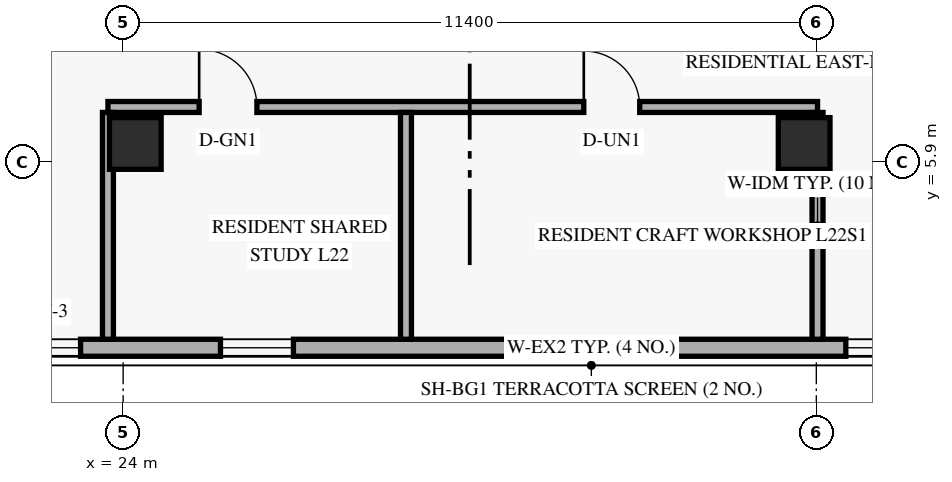
"""IFC4 building model, lengths in metres.
Left out: names, types, materials, properties, quantities, classifications, styles, units other than length and angle.
Written with IfcOpenShell. Run it as: python <this file> out.ifc"""

import sys

from ifc_helpers import new_model, si_unit, direction, frame, frame_2d, origin, origin_2d, place, context, subcontext, project, spatial, rectangle, extrude, element, fill, save


model = new_model("IFC4")
c1 = context("Model", 3, precision=1e-05, world=origin(), true_north=direction((0.0, 1.0)))
c2 = subcontext(c1, "Body", "Model", "MODEL_VIEW")
j1 = project(units=[si_unit("LENGTHUNIT", "METRE"), si_unit("PLANEANGLEUNIT", "RADIAN")], contexts=[c1])
p1 = place(None, origin())
s1 = spatial("IfcSite", under=j1, at=p1, CompositionType="ELEMENT")
p2 = place(p1, origin())
s2 = spatial("IfcBuilding", under=s1, at=p2, CompositionType="ELEMENT")
p3 = place(p2, frame((0.0, 0.0, 87.6)))
s3 = spatial("IfcBuildingStorey", under=s2, at=p3, CompositionType="ELEMENT", Elevation=87.6)
for number, where, z_axis, x_axis in (
    (1, (24.2, 6.2, 0.0), (0.0, 0.0, 1.0), (1.0, 0.0, 0.0)),
    (2, (35.2, 6.2, 0.0), (0.0, 0.0, 1.0), (1.0, 0.0, 0.0)),
):
    element("IfcColumn", number, at=place(p3, frame(where, z_axis=z_axis, x_axis=x_axis)), inside=s3, PredefinedType="COLUMN", context=c2, shape_type="SweptSolid", body=[
        extrude(rectangle(XDim=0.85, YDim=0.85, at=origin_2d()), origin(), (0.0, 0.0, 1.0), 3.6),
    ])
p4 = place(p3, frame((13.42, 2.84, 0.0), z_axis=(0.0, 0.0, 1.0), x_axis=(1.0, 0.0, 0.0)))
e3 = element("IfcWall", 3, at=p4, inside=s3, PredefinedType="SOLIDWALL", context=c2, shape_type="SweptSolid", body=[
    extrude(rectangle(XDim=36.56, YDim=0.28, at=frame_2d((18.28, 0.0))), origin(), (0.0, 0.0, 1.0), 3.36),
])
p5 = place(p4, frame((3.515, 0.0, 0.85)))
e4 = element("IfcOpeningElement", 4, at=p5, cuts=e3, PredefinedType="OPENING", context=c2, shape_type="SweptSolid", body=[
    extrude(rectangle(XDim=1.2, YDim=1.5, at=frame_2d((0.6, 0.75))), frame((0.0, 0.15, 0.0), z_axis=(0.0, -1.0, 0.0), x_axis=(1.0, 0.0, 0.0)), (0.0, 0.0, 1.0), 0.3),
])
p6 = place(p4, frame((8.68, 0.0, 0.85)))
e5 = element("IfcOpeningElement", 5, at=p6, cuts=e3, PredefinedType="OPENING", context=c2, shape_type="SweptSolid", body=[
    extrude(rectangle(XDim=1.2, YDim=1.5, at=frame_2d((0.6, 0.75))), frame((0.0, 0.15, 0.0), z_axis=(0.0, -1.0, 0.0), x_axis=(1.0, 0.0, 0.0)), (0.0, 0.0, 1.0), 0.3),
])
p7 = place(p4, frame((12.181, 0.0, 0.85)))
e6 = element("IfcOpeningElement", 6, at=p7, cuts=e3, PredefinedType="OPENING", context=c2, shape_type="SweptSolid", body=[
    extrude(rectangle(XDim=1.2, YDim=1.5, at=frame_2d((0.6, 0.75))), frame((0.0, 0.15, 0.0), z_axis=(0.0, -1.0, 0.0), x_axis=(1.0, 0.0, 0.0)), (0.0, 0.0, 1.0), 0.3),
])
p8 = place(p4, frame((18.016, 0.0, 0.85)))
e7 = element("IfcOpeningElement", 7, at=p8, cuts=e3, PredefinedType="OPENING", context=c2, shape_type="SweptSolid", body=[
    extrude(rectangle(XDim=1.2, YDim=1.5, at=frame_2d((0.6, 0.75))), frame((0.0, 0.15, 0.0), z_axis=(0.0, -1.0, 0.0), x_axis=(1.0, 0.0, 0.0)), (0.0, 0.0, 1.0), 0.3),
])
p9 = place(p4, frame((22.465, 0.0, 0.85)))
e8 = element("IfcOpeningElement", 8, at=p9, cuts=e3, PredefinedType="OPENING", context=c2, shape_type="SweptSolid", body=[
    extrude(rectangle(XDim=1.2, YDim=1.5, at=frame_2d((0.6, 0.75))), frame((0.0, 0.15, 0.0), z_axis=(0.0, -1.0, 0.0), x_axis=(1.0, 0.0, 0.0)), (0.0, 0.0, 1.0), 0.3),
])
p10 = place(p4, frame((29.745, 0.0, 0.85)))
e9 = element("IfcOpeningElement", 9, at=p10, cuts=e3, PredefinedType="OPENING", context=c2, shape_type="SweptSolid", body=[
    extrude(rectangle(XDim=1.2, YDim=1.5, at=frame_2d((0.6, 0.75))), frame((0.0, 0.15, 0.0), z_axis=(0.0, -1.0, 0.0), x_axis=(1.0, 0.0, 0.0)), (0.0, 0.0, 1.0), 0.3),
])
p11 = place(p3, frame((23.75, 6.8, 0.0), z_axis=(0.0, 0.0, 1.0), x_axis=(1.0, 0.0, 0.0)))
e10 = element("IfcWall", 10, at=p11, inside=s3, PredefinedType="STANDARD", context=c2, shape_type="SweptSolid", body=[
    extrude(rectangle(XDim=11.67, YDim=0.18, at=frame_2d((5.835, 0.0))), origin(), (0.0, 0.0, 1.0), 2.731),
])
p12 = place(p11, frame((1.5, 0.0, 0.0)))
e11 = element("IfcOpeningElement", 11, at=p12, cuts=e10, PredefinedType="OPENING", context=c2, shape_type="SweptSolid", body=[
    extrude(rectangle(XDim=0.95, YDim=2.15, at=frame_2d((0.475, 1.075))), frame((0.0, 0.1, 0.0), z_axis=(0.0, -1.0, 0.0), x_axis=(1.0, 0.0, 0.0)), (0.0, 0.0, 1.0), 0.2),
])
p13 = place(p11, frame((7.826, 0.0, 0.0)))
e12 = element("IfcOpeningElement", 12, at=p13, cuts=e10, PredefinedType="OPENING", context=c2, shape_type="SweptSolid", body=[
    extrude(rectangle(XDim=0.92, YDim=2.15, at=frame_2d((0.46, 1.075))), frame((0.0, 0.1, 0.0), z_axis=(0.0, -1.0, 0.0), x_axis=(1.0, 0.0, 0.0)), (0.0, 0.0, 1.0), 0.2),
])
p14 = place(p3, frame((35.42, 2.98, 0.0), z_axis=(0.0, 0.0, 1.0), x_axis=(0.0, 1.0, 0.0)))
e13 = element("IfcWall", 13, at=p14, inside=s3, PredefinedType="PARTITIONING", context=c2, shape_type="SweptSolid", body=[
    extrude(rectangle(XDim=3.73, YDim=0.18, at=frame_2d((1.865, 0.0))), origin(), (0.0, 0.0, 1.0), 2.731),
])
for number, where, z_axis, x_axis in (
    (14, (23.75, 2.98, 0.0), (0.0, 0.0, 1.0), (0.0, 1.0, 0.0)),
    (15, (28.651, 2.98, 0.0), (0.0, 0.0, 1.0), (0.0, 1.0, 0.0)),
):
    element("IfcWall", number, at=place(p3, frame(where, z_axis=z_axis, x_axis=x_axis)), inside=s3, PredefinedType="PARTITIONING", context=c2, shape_type="SweptSolid", body=[
        extrude(rectangle(XDim=3.73, YDim=0.18, at=frame_2d((1.865, 0.0))), origin(), (0.0, 0.0, 1.0), 2.809),
    ])
p15 = place(p6, origin())
e16 = element("IfcWindow", 16, at=p15, inside=s3, PartitioningType="SINGLE_PANEL", PredefinedType="WINDOW", context=c2, shape_type="SweptSolid", body=[
    extrude(rectangle(XDim=1.2, YDim=1.5, at=frame_2d((0.6, 0.75))), frame((0.0, 0.03, 0.0), z_axis=(0.0, -1.0, 0.0), x_axis=(1.0, 0.0, 0.0)), (0.0, 0.0, 1.0), 0.06),
])
fill(e5, e16)
p16 = place(p7, origin())
e17 = element("IfcWindow", 17, at=p16, inside=s3, PartitioningType="SINGLE_PANEL", PredefinedType="WINDOW", context=c2, shape_type="SweptSolid", body=[
    extrude(rectangle(XDim=1.2, YDim=1.5, at=frame_2d((0.6, 0.75))), frame((0.0, 0.03, 0.0), z_axis=(0.0, -1.0, 0.0), x_axis=(1.0, 0.0, 0.0)), (0.0, 0.0, 1.0), 0.06),
])
fill(e6, e17)
p17 = place(p8, origin())
e18 = element("IfcWindow", 18, at=p17, inside=s3, PartitioningType="SINGLE_PANEL", PredefinedType="WINDOW", context=c2, shape_type="SweptSolid", body=[
    extrude(rectangle(XDim=1.2, YDim=1.5, at=frame_2d((0.6, 0.75))), frame((0.0, 0.03, 0.0), z_axis=(0.0, -1.0, 0.0), x_axis=(1.0, 0.0, 0.0)), (0.0, 0.0, 1.0), 0.06),
])
fill(e7, e18)
p18 = place(p9, origin())
e19 = element("IfcWindow", 19, at=p18, inside=s3, PartitioningType="SINGLE_PANEL", PredefinedType="WINDOW", context=c2, shape_type="SweptSolid", body=[
    extrude(rectangle(XDim=1.2, YDim=1.5, at=frame_2d((0.6, 0.75))), frame((0.0, 0.03, 0.0), z_axis=(0.0, -1.0, 0.0), x_axis=(1.0, 0.0, 0.0)), (0.0, 0.0, 1.0), 0.06),
])
fill(e8, e19)
p19 = place(p12, origin())
e20 = element("IfcDoor", 20, at=p19, inside=s3, OperationType="SINGLE_SWING_LEFT", PredefinedType="DOOR", context=c2, shape_type="SweptSolid", body=[
    extrude(rectangle(XDim=0.95, YDim=2.15, at=frame_2d((0.475, 1.075))), frame((0.0, 0.025, 0.0), z_axis=(0.0, -1.0, 0.0), x_axis=(1.0, 0.0, 0.0)), (0.0, 0.0, 1.0), 0.05),
])
fill(e11, e20)
p20 = place(p13, origin())
e21 = element("IfcDoor", 21, at=p20, inside=s3, OperationType="SINGLE_SWING_LEFT", PredefinedType="DOOR", context=c2, shape_type="SweptSolid", body=[
    extrude(rectangle(XDim=0.92, YDim=2.15, at=frame_2d((0.46, 1.075))), frame((0.0, 0.025, 0.0), z_axis=(0.0, -1.0, 0.0), x_axis=(1.0, 0.0, 0.0)), (0.0, 0.0, 1.0), 0.05),
])
fill(e12, e21)
save(model, sys.argv[1])
